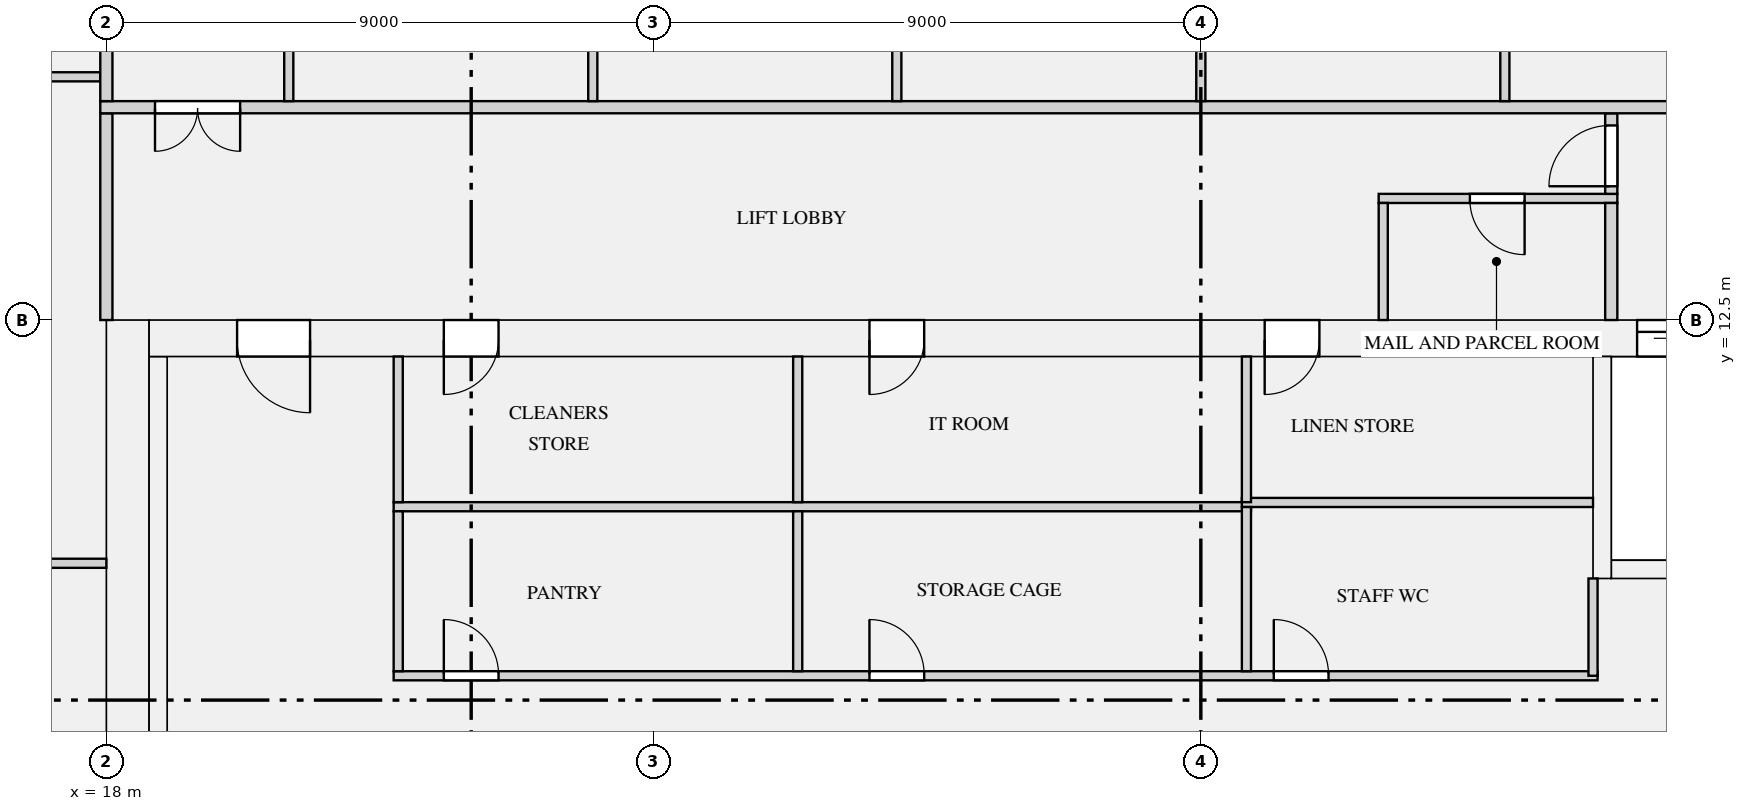
"""IFC4 building model, lengths in metres.
Left out: names, types, materials, properties, quantities, classifications, styles, units other than length and angle.
Written with IfcOpenShell. Run it as: python <this file> out.ifc"""

import sys

from ifc_helpers import new_model, si_unit, direction, frame, frame_2d, origin, place, context, subcontext, project, spatial, rectangle, extrude, element, fill, save


model = new_model("IFC4")
c1 = context("Model", 3, precision=1e-05, world=origin(), true_north=direction((0.0, 1.0)))
c2 = subcontext(c1, "Body", "Model", "MODEL_VIEW")
j1 = project(units=[si_unit("LENGTHUNIT", "METRE"), si_unit("PLANEANGLEUNIT", "RADIAN")], contexts=[c1])
p1 = place(None, origin())
s1 = spatial("IfcSite", under=j1, at=p1, CompositionType="ELEMENT")
p2 = place(p1, origin())
s2 = spatial("IfcBuilding", under=s1, at=p2, CompositionType="ELEMENT")
p3 = place(p2, frame((0.0, 0.0, 182.25)))
s3 = spatial("IfcBuildingStorey", under=s2, at=p3, CompositionType="ELEMENT", Elevation=182.25)
p4 = place(p3, frame((18.35, 0.0, 0.0), z_axis=(0.0, 0.0, 1.0), x_axis=(0.0, 1.0, 0.0)))
e1 = element("IfcWall", 1, at=p4, inside=s3, PredefinedType="SHEAR", context=c2, shape_type="SweptSolid", body=[
    extrude(rectangle(XDim=12.5, YDim=0.7, at=frame_2d((6.25, 0.0))), origin(), (0.0, 0.0, 1.0), 3.15),
])
p5 = place(p3, frame((18.7, 12.2, 0.0), z_axis=(0.0, 0.0, 1.0), x_axis=(1.0, 0.0, 0.0)))
e2 = element("IfcWall", 2, at=p5, inside=s3, PredefinedType="SHEAR", context=c2, shape_type="SweptSolid", body=[
    extrude(rectangle(XDim=34.6, YDim=0.6, at=frame_2d((17.3, 0.0))), origin(), (0.0, 0.0, 1.0), 3.15),
])
p6 = place(p5, frame((24.475, 0.0, 0.0)))
e3 = element("IfcOpeningElement", 3, at=p6, cuts=e2, PredefinedType="OPENING", context=c2, shape_type="SweptSolid", body=[
    extrude(rectangle(XDim=1.1, YDim=2.1, at=frame_2d((0.55, 1.05))), frame((0.0, 0.31, 0.0), z_axis=(0.0, -1.0, 0.0), x_axis=(1.0, 0.0, 0.0)), (0.0, 0.0, 1.0), 0.62),
])
p7 = place(p5, frame((26.725, 0.0, 0.0)))
e4 = element("IfcOpeningElement", 4, at=p7, cuts=e2, PredefinedType="OPENING", context=c2, shape_type="SweptSolid", body=[
    extrude(rectangle(XDim=1.1, YDim=2.1, at=frame_2d((0.55, 1.05))), frame((0.0, 0.31, 0.0), z_axis=(0.0, -1.0, 0.0), x_axis=(1.0, 0.0, 0.0)), (0.0, 0.0, 1.0), 0.62),
])
p8 = place(p5, frame((28.975, 0.0, 0.0)))
e5 = element("IfcOpeningElement", 5, at=p8, cuts=e2, PredefinedType="OPENING", context=c2, shape_type="SweptSolid", body=[
    extrude(rectangle(XDim=1.1, YDim=2.1, at=frame_2d((0.55, 1.05))), frame((0.0, 0.31, 0.0), z_axis=(0.0, -1.0, 0.0), x_axis=(1.0, 0.0, 0.0)), (0.0, 0.0, 1.0), 0.62),
])
p9 = place(p5, frame((4.85, 0.0, 0.0)))
e6 = element("IfcOpeningElement", 6, at=p9, cuts=e2, PredefinedType="OPENING", context=c2, shape_type="SweptSolid", body=[
    extrude(rectangle(XDim=0.9, YDim=2.1, at=frame_2d((0.45, 1.05))), frame((0.0, 0.31, 0.0), z_axis=(0.0, -1.0, 0.0), x_axis=(1.0, 0.0, 0.0)), (0.0, 0.0, 1.0), 0.62),
])
p10 = place(p5, frame((11.85, 0.0, 0.0)))
e7 = element("IfcOpeningElement", 7, at=p10, cuts=e2, PredefinedType="OPENING", context=c2, shape_type="SweptSolid", body=[
    extrude(rectangle(XDim=0.9, YDim=2.1, at=frame_2d((0.45, 1.05))), frame((0.0, 0.31, 0.0), z_axis=(0.0, -1.0, 0.0), x_axis=(1.0, 0.0, 0.0)), (0.0, 0.0, 1.0), 0.62),
])
p11 = place(p5, frame((18.35, 0.0, 0.0)))
e8 = element("IfcOpeningElement", 8, at=p11, cuts=e2, PredefinedType="OPENING", context=c2, shape_type="SweptSolid", body=[
    extrude(rectangle(XDim=0.9, YDim=2.1, at=frame_2d((0.45, 1.05))), frame((0.0, 0.31, 0.0), z_axis=(0.0, -1.0, 0.0), x_axis=(1.0, 0.0, 0.0)), (0.0, 0.0, 1.0), 0.62),
])
p12 = place(p5, frame((1.45, 0.0, 0.0)))
e9 = element("IfcOpeningElement", 9, at=p12, cuts=e2, PredefinedType="OPENING", context=c2, shape_type="SweptSolid", body=[
    extrude(rectangle(XDim=1.2, YDim=2.1, at=frame_2d((0.6, 1.05))), frame((0.0, 0.31, 0.0), z_axis=(0.0, -1.0, 0.0), x_axis=(1.0, 0.0, 0.0)), (0.0, 0.0, 1.0), 0.62),
])
p13 = place(p5, frame((31.95, 0.0, 0.0)))
e10 = element("IfcOpeningElement", 10, at=p13, cuts=e2, PredefinedType="OPENING", context=c2, shape_type="SweptSolid", body=[
    extrude(rectangle(XDim=1.2, YDim=2.1, at=frame_2d((0.6, 1.05))), frame((0.0, 0.31, 0.0), z_axis=(0.0, -1.0, 0.0), x_axis=(1.0, 0.0, 0.0)), (0.0, 0.0, 1.0), 0.62),
])
p14 = place(p3, frame((18.85, 1.0, 0.0), z_axis=(0.0, 0.0, 1.0), x_axis=(0.0, 1.0, 0.0)))
e11 = element("IfcWall", 11, at=p14, inside=s3, PredefinedType="SHEAR", context=c2, shape_type="SweptSolid", body=[
    extrude(rectangle(XDim=10.9, YDim=0.3, at=frame_2d((5.45, 0.0))), origin(), (0.0, 0.0, 1.0), 3.15),
])
p15 = place(p3, frame((42.75, 8.4, 0.0), z_axis=(0.0, 0.0, 1.0), x_axis=(1.0, 0.0, 0.0)))
e12 = element("IfcWall", 12, at=p15, inside=s3, PredefinedType="SHEAR", context=c2, shape_type="SweptSolid", body=[
    extrude(rectangle(XDim=1.95, YDim=0.3, at=frame_2d((0.975, 0.0))), origin(), (0.0, 0.0, 1.0), 3.15),
])
p16 = place(p3, frame((42.6, 8.25, 0.0), z_axis=(0.0, 0.0, 1.0), x_axis=(0.0, 1.0, 0.0)))
e13 = element("IfcWall", 13, at=p16, inside=s3, PredefinedType="SHEAR", context=c2, shape_type="SweptSolid", body=[
    extrude(rectangle(XDim=3.65, YDim=0.3, at=frame_2d((1.825, 0.0))), origin(), (0.0, 0.0, 1.0), 3.15),
])
p17 = place(p3, frame((22.725, 6.65, 0.0), z_axis=(0.0, 0.0, 1.0), x_axis=(1.0, 0.0, 0.0)))
e14 = element("IfcWall", 14, at=p17, inside=s3, PredefinedType="PARTITIONING", context=c2, shape_type="SweptSolid", body=[
    extrude(rectangle(XDim=19.8, YDim=0.15, at=frame_2d((9.9, 0.0))), origin(), (0.0, 0.0, 1.0), 2.65),
])
p18 = place(p17, frame((0.825, 0.0, 0.0)))
e15 = element("IfcOpeningElement", 15, at=p18, cuts=e14, PredefinedType="OPENING", context=c2, shape_type="SweptSolid", body=[
    extrude(rectangle(XDim=0.9, YDim=2.1, at=frame_2d((0.45, 1.05))), frame((0.0, 0.085, 0.0), z_axis=(0.0, -1.0, 0.0), x_axis=(1.0, 0.0, 0.0)), (0.0, 0.0, 1.0), 0.17),
])
p19 = place(p17, frame((7.825, 0.0, 0.0)))
e16 = element("IfcOpeningElement", 16, at=p19, cuts=e14, PredefinedType="OPENING", context=c2, shape_type="SweptSolid", body=[
    extrude(rectangle(XDim=0.9, YDim=2.1, at=frame_2d((0.45, 1.05))), frame((0.0, 0.085, 0.0), z_axis=(0.0, -1.0, 0.0), x_axis=(1.0, 0.0, 0.0)), (0.0, 0.0, 1.0), 0.17),
])
p20 = place(p17, frame((14.475, 0.0, 0.0)))
e17 = element("IfcOpeningElement", 17, at=p20, cuts=e14, PredefinedType="OPENING", context=c2, shape_type="SweptSolid", body=[
    extrude(rectangle(XDim=0.9, YDim=2.1, at=frame_2d((0.45, 1.05))), frame((0.0, 0.085, 0.0), z_axis=(0.0, -1.0, 0.0), x_axis=(1.0, 0.0, 0.0)), (0.0, 0.0, 1.0), 0.17),
])
p21 = place(p3, frame((22.725, 9.43, 0.0), z_axis=(0.0, 0.0, 1.0), x_axis=(1.0, 0.0, 0.0)))
e18 = element("IfcWall", 18, at=p21, inside=s3, PredefinedType="PARTITIONING", context=c2, shape_type="SweptSolid", body=[
    extrude(rectangle(XDim=14.1, YDim=0.15, at=frame_2d((7.05, 0.0))), origin(), (0.0, 0.0, 1.0), 2.65),
])
p22 = place(p3, frame((36.675, 9.5, 0.0), z_axis=(0.0, 0.0, 1.0), x_axis=(1.0, 0.0, 0.0)))
e19 = element("IfcWall", 19, at=p22, inside=s3, PredefinedType="PARTITIONING", context=c2, shape_type="SweptSolid", body=[
    extrude(rectangle(XDim=5.775, YDim=0.15, at=frame_2d((2.887, 0.0))), origin(), (0.0, 0.0, 1.0), 2.65),
])
p23 = place(p3, frame((38.925, 14.5, 0.0), z_axis=(0.0, 0.0, 1.0), x_axis=(1.0, 0.0, 0.0)))
e20 = element("IfcWall", 20, at=p23, inside=s3, PredefinedType="PARTITIONING", context=c2, shape_type="SweptSolid", body=[
    extrude(rectangle(XDim=3.925, YDim=0.15, at=frame_2d((1.962, 0.0))), origin(), (0.0, 0.0, 1.0), 2.65),
])
p24 = place(p23, frame((1.5, 0.0, 0.0)))
e21 = element("IfcOpeningElement", 21, at=p24, cuts=e20, PredefinedType="OPENING", context=c2, shape_type="SweptSolid", body=[
    extrude(rectangle(XDim=0.9, YDim=2.1, at=frame_2d((0.45, 1.05))), frame((0.0, 0.085, 0.0), z_axis=(0.0, -1.0, 0.0), x_axis=(1.0, 0.0, 0.0)), (0.0, 0.0, 1.0), 0.17),
])
p25 = place(p3, frame((42.45, 6.65, 0.0), z_axis=(0.0, 0.0, 1.0), x_axis=(0.0, 1.0, 0.0)))
e22 = element("IfcWall", 22, at=p25, inside=s3, PredefinedType="PARTITIONING", context=c2, shape_type="SweptSolid", body=[
    extrude(rectangle(XDim=1.6, YDim=0.15, at=frame_2d((0.8, 0.0))), origin(), (0.0, 0.0, 1.0), 2.65),
])
for number, where, z_axis, x_axis in (
    (23, (22.8, 6.725, 0.0), (0.0, 0.0, 1.0), (0.0, 1.0, 0.0)),
    (24, (29.37, 6.725, 0.0), (0.0, 0.0, 1.0), (0.0, 1.0, 0.0)),
):
    element("IfcWall", number, at=place(p3, frame(where, z_axis=z_axis, x_axis=x_axis)), inside=s3, PredefinedType="PARTITIONING", context=c2, shape_type="SweptSolid", body=[
        extrude(rectangle(XDim=2.63, YDim=0.15, at=frame_2d((1.315, 0.0))), origin(), (0.0, 0.0, 1.0), 2.65),
    ])
p26 = place(p3, frame((36.75, 6.725, 0.0), z_axis=(0.0, 0.0, 1.0), x_axis=(0.0, 1.0, 0.0)))
e25 = element("IfcWall", 25, at=p26, inside=s3, PredefinedType="PARTITIONING", context=c2, shape_type="SweptSolid", body=[
    extrude(rectangle(XDim=2.7, YDim=0.15, at=frame_2d((1.35, 0.0))), origin(), (0.0, 0.0, 1.0), 2.65),
])
for number, where, z_axis, x_axis in (
    (26, (22.8, 9.505, 0.0), (0.0, 0.0, 1.0), (0.0, 1.0, 0.0)),
    (27, (29.37, 9.505, 0.0), (0.0, 0.0, 1.0), (0.0, 1.0, 0.0)),
    (28, (36.75, 9.505, 0.0), (0.0, 0.0, 1.0), (0.0, 1.0, 0.0)),
):
    element("IfcWall", number, at=place(p3, frame(where, z_axis=z_axis, x_axis=x_axis)), inside=s3, PredefinedType="PARTITIONING", context=c2, shape_type="SweptSolid", body=[
        extrude(rectangle(XDim=2.395, YDim=0.15, at=frame_2d((1.198, 0.0))), origin(), (0.0, 0.0, 1.0), 2.65),
    ])
p27 = place(p3, frame((18.0, 12.5, 0.0), z_axis=(0.0, 0.0, 1.0), x_axis=(0.0, 1.0, 0.0)))
e29 = element("IfcWall", 29, at=p27, inside=s3, PredefinedType="PARTITIONING", context=c2, shape_type="SweptSolid", body=[
    extrude(rectangle(XDim=3.4, YDim=0.2, at=frame_2d((1.7, 0.0))), origin(), (0.0, 0.0, 1.0), 2.65),
])
p28 = place(p3, frame((39.0, 12.5, 0.0), z_axis=(0.0, 0.0, 1.0), x_axis=(0.0, 1.0, 0.0)))
e30 = element("IfcWall", 30, at=p28, inside=s3, PredefinedType="PARTITIONING", context=c2, shape_type="SweptSolid", body=[
    extrude(rectangle(XDim=1.925, YDim=0.15, at=frame_2d((0.962, 0.0))), origin(), (0.0, 0.0, 1.0), 2.65),
])
p29 = place(p3, frame((42.75, 12.5, 0.0), z_axis=(0.0, 0.0, 1.0), x_axis=(0.0, 1.0, 0.0)))
e31 = element("IfcWall", 31, at=p29, inside=s3, PredefinedType="PARTITIONING", context=c2, shape_type="SweptSolid", body=[
    extrude(rectangle(XDim=1.925, YDim=0.2, at=frame_2d((0.962, 0.0))), origin(), (0.0, 0.0, 1.0), 2.65),
])
p30 = place(p3, frame((42.75, 14.575, 0.0), z_axis=(0.0, 0.0, 1.0), x_axis=(0.0, 1.0, 0.0)))
e32 = element("IfcWall", 32, at=p30, inside=s3, PredefinedType="PARTITIONING", context=c2, shape_type="SweptSolid", body=[
    extrude(rectangle(XDim=1.325, YDim=0.2, at=frame_2d((0.663, 0.0))), origin(), (0.0, 0.0, 1.0), 2.65),
])
p31 = place(p30, frame((0.125, 0.0, 0.0)))
e33 = element("IfcOpeningElement", 33, at=p31, cuts=e32, PredefinedType="OPENING", context=c2, shape_type="SweptSolid", body=[
    extrude(rectangle(XDim=1.0, YDim=2.1, at=frame_2d((0.5, 1.05))), frame((0.0, 0.11, 0.0), z_axis=(0.0, -1.0, 0.0), x_axis=(1.0, 0.0, 0.0)), (0.0, 0.0, 1.0), 0.22),
])
p32 = place(p3, frame((7.7, 16.5, 0.0), z_axis=(0.0, 0.0, 1.0), x_axis=(1.0, 0.0, 0.0)))
e34 = element("IfcWall", 34, at=p32, inside=s3, PredefinedType="PARTITIONING", context=c2, shape_type="SweptSolid", body=[
    extrude(rectangle(XDim=10.2, YDim=0.15, at=frame_2d((5.1, 0.0))), origin(), (0.0, 0.0, 1.0), 2.65),
])
p33 = place(p32, frame((7.3, 0.0, 0.0)))
e35 = element("IfcOpeningElement", 35, at=p33, cuts=e34, PredefinedType="OPENING", context=c2, shape_type="SweptSolid", body=[
    extrude(rectangle(XDim=1.5, YDim=2.1, at=frame_2d((0.75, 1.05))), frame((0.0, 0.085, 0.0), z_axis=(0.0, -1.0, 0.0), x_axis=(1.0, 0.0, 0.0)), (0.0, 0.0, 1.0), 0.17),
])
p34 = place(p3, frame((9.075, 8.5, 0.0), z_axis=(0.0, 0.0, 1.0), x_axis=(1.0, 0.0, 0.0)))
e36 = element("IfcWall", 36, at=p34, inside=s3, PredefinedType="PARTITIONING", context=c2, shape_type="SweptSolid", body=[
    extrude(rectangle(XDim=8.925, YDim=0.15, at=frame_2d((4.462, 0.0))), origin(), (0.0, 0.0, 1.0), 2.65),
])
p35 = place(p34, frame((1.725, 0.0, 0.0)))
e37 = element("IfcOpeningElement", 37, at=p35, cuts=e36, PredefinedType="OPENING", context=c2, shape_type="SweptSolid", body=[
    extrude(rectangle(XDim=0.9, YDim=2.1, at=frame_2d((0.45, 1.05))), frame((0.0, 0.085, 0.0), z_axis=(0.0, -1.0, 0.0), x_axis=(1.0, 0.0, 0.0)), (0.0, 0.0, 1.0), 0.17),
])
p36 = place(p34, frame((6.225, 0.0, 0.0)))
e38 = element("IfcOpeningElement", 38, at=p36, cuts=e36, PredefinedType="OPENING", context=c2, shape_type="SweptSolid", body=[
    extrude(rectangle(XDim=0.9, YDim=2.1, at=frame_2d((0.45, 1.05))), frame((0.0, 0.085, 0.0), z_axis=(0.0, -1.0, 0.0), x_axis=(1.0, 0.0, 0.0)), (0.0, 0.0, 1.0), 0.17),
])
p37 = place(p3, frame((17.9, 16.0, 0.0), z_axis=(0.0, 0.0, 1.0), x_axis=(1.0, 0.0, 0.0)))
e39 = element("IfcWall", 39, at=p37, inside=s3, PredefinedType="PARTITIONING", context=c2, shape_type="SweptSolid", body=[
    extrude(rectangle(XDim=36.2, YDim=0.2, at=frame_2d((18.1, 0.0))), origin(), (0.0, 0.0, 1.0), 2.65),
])
p38 = place(p37, frame((0.9, 0.0, 0.0)))
e40 = element("IfcOpeningElement", 40, at=p38, cuts=e39, PredefinedType="OPENING", context=c2, shape_type="SweptSolid", body=[
    extrude(rectangle(XDim=1.4, YDim=2.1, at=frame_2d((0.7, 1.05))), frame((0.0, 0.11, 0.0), z_axis=(0.0, -1.0, 0.0), x_axis=(1.0, 0.0, 0.0)), (0.0, 0.0, 1.0), 0.22),
])
p39 = place(p37, frame((33.9, 0.0, 0.0)))
e41 = element("IfcOpeningElement", 41, at=p39, cuts=e39, PredefinedType="OPENING", context=c2, shape_type="SweptSolid", body=[
    extrude(rectangle(XDim=1.4, YDim=2.1, at=frame_2d((0.7, 1.05))), frame((0.0, 0.11, 0.0), z_axis=(0.0, -1.0, 0.0), x_axis=(1.0, 0.0, 0.0)), (0.0, 0.0, 1.0), 0.22),
])
p40 = place(p3, frame((18.0, 16.1, 0.0), z_axis=(0.0, 0.0, 1.0), x_axis=(0.0, 1.0, 0.0)))
e42 = element("IfcWall", 42, at=p40, inside=s3, PredefinedType="PARTITIONING", context=c2, shape_type="SweptSolid", body=[
    extrude(rectangle(XDim=7.8, YDim=0.2, at=frame_2d((3.9, 0.0))), origin(), (0.0, 0.0, 1.0), 2.65),
])
for number, where, z_axis, x_axis in (
    (43, (21.0, 16.1, 0.0), (0.0, 0.0, 1.0), (0.0, 1.0, 0.0)),
    (44, (26.0, 16.1, 0.0), (0.0, 0.0, 1.0), (0.0, 1.0, 0.0)),
    (45, (31.0, 16.1, 0.0), (0.0, 0.0, 1.0), (0.0, 1.0, 0.0)),
    (46, (36.0, 16.1, 0.0), (0.0, 0.0, 1.0), (0.0, 1.0, 0.0)),
    (47, (41.0, 16.1, 0.0), (0.0, 0.0, 1.0), (0.0, 1.0, 0.0)),
):
    element("IfcWall", number, at=place(p3, frame(where, z_axis=z_axis, x_axis=x_axis)), inside=s3, PredefinedType="PARTITIONING", context=c2, shape_type="SweptSolid", body=[
        extrude(rectangle(XDim=4.825, YDim=0.15, at=frame_2d((2.413, 0.0))), origin(), (0.0, 0.0, 1.0), 2.65),
    ])
p41 = place(p6, origin())
e48 = element("IfcDoor", 48, at=p41, inside=s3, OperationType="DOUBLE_DOOR_SLIDING", PredefinedType="DOOR", context=c2, shape_type="SweptSolid", body=[
    extrude(rectangle(XDim=1.1, YDim=2.1, at=frame_2d((0.55, 1.05))), frame((0.0, 0.025, 0.0), z_axis=(0.0, -1.0, 0.0), x_axis=(1.0, 0.0, 0.0)), (0.0, 0.0, 1.0), 0.05),
])
fill(e3, e48)
p42 = place(p24, frame((0.9, 0.0, 0.0), z_axis=(0.0, 0.0, 1.0), x_axis=(-1.0, 0.0, 0.0)))
e49 = element("IfcDoor", 49, at=p42, inside=s3, OperationType="SINGLE_SWING_LEFT", PredefinedType="DOOR", context=c2, shape_type="SweptSolid", body=[
    extrude(rectangle(XDim=0.9, YDim=2.1, at=frame_2d((0.45, 1.05))), frame((0.0, 0.025, 0.0), z_axis=(0.0, -1.0, 0.0), x_axis=(1.0, 0.0, 0.0)), (0.0, 0.0, 1.0), 0.05),
])
fill(e21, e49)
p43 = place(p18, origin())
e50 = element("IfcDoor", 50, at=p43, inside=s3, OperationType="SINGLE_SWING_LEFT", PredefinedType="DOOR", context=c2, shape_type="SweptSolid", body=[
    extrude(rectangle(XDim=0.9, YDim=2.1, at=frame_2d((0.45, 1.05))), frame((0.0, 0.025, 0.0), z_axis=(0.0, -1.0, 0.0), x_axis=(1.0, 0.0, 0.0)), (0.0, 0.0, 1.0), 0.05),
])
fill(e15, e50)
p44 = place(p19, origin())
e51 = element("IfcDoor", 51, at=p44, inside=s3, OperationType="SINGLE_SWING_LEFT", PredefinedType="DOOR", context=c2, shape_type="SweptSolid", body=[
    extrude(rectangle(XDim=0.9, YDim=2.1, at=frame_2d((0.45, 1.05))), frame((0.0, 0.025, 0.0), z_axis=(0.0, -1.0, 0.0), x_axis=(1.0, 0.0, 0.0)), (0.0, 0.0, 1.0), 0.05),
])
fill(e16, e51)
p45 = place(p9, frame((0.9, 0.0, 0.0), z_axis=(0.0, 0.0, 1.0), x_axis=(-1.0, 0.0, 0.0)))
e52 = element("IfcDoor", 52, at=p45, inside=s3, OperationType="SINGLE_SWING_RIGHT", PredefinedType="DOOR", context=c2, shape_type="SweptSolid", body=[
    extrude(rectangle(XDim=0.9, YDim=2.1, at=frame_2d((0.45, 1.05))), frame((0.0, 0.025, 0.0), z_axis=(0.0, -1.0, 0.0), x_axis=(1.0, 0.0, 0.0)), (0.0, 0.0, 1.0), 0.05),
])
fill(e6, e52)
p46 = place(p10, frame((0.9, 0.0, 0.0), z_axis=(0.0, 0.0, 1.0), x_axis=(-1.0, 0.0, 0.0)))
e53 = element("IfcDoor", 53, at=p46, inside=s3, OperationType="SINGLE_SWING_RIGHT", PredefinedType="DOOR", context=c2, shape_type="SweptSolid", body=[
    extrude(rectangle(XDim=0.9, YDim=2.1, at=frame_2d((0.45, 1.05))), frame((0.0, 0.025, 0.0), z_axis=(0.0, -1.0, 0.0), x_axis=(1.0, 0.0, 0.0)), (0.0, 0.0, 1.0), 0.05),
])
fill(e7, e53)
p47 = place(p20, origin())
e54 = element("IfcDoor", 54, at=p47, inside=s3, OperationType="SINGLE_SWING_LEFT", PredefinedType="DOOR", context=c2, shape_type="SweptSolid", body=[
    extrude(rectangle(XDim=0.9, YDim=2.1, at=frame_2d((0.45, 1.05))), frame((0.0, 0.025, 0.0), z_axis=(0.0, -1.0, 0.0), x_axis=(1.0, 0.0, 0.0)), (0.0, 0.0, 1.0), 0.05),
])
fill(e17, e54)
p48 = place(p11, frame((0.9, 0.0, 0.0), z_axis=(0.0, 0.0, 1.0), x_axis=(-1.0, 0.0, 0.0)))
e55 = element("IfcDoor", 55, at=p48, inside=s3, OperationType="SINGLE_SWING_RIGHT", PredefinedType="DOOR", context=c2, shape_type="SweptSolid", body=[
    extrude(rectangle(XDim=0.9, YDim=2.1, at=frame_2d((0.45, 1.05))), frame((0.0, 0.025, 0.0), z_axis=(0.0, -1.0, 0.0), x_axis=(1.0, 0.0, 0.0)), (0.0, 0.0, 1.0), 0.05),
])
fill(e8, e55)
p49 = place(p12, frame((1.2, 0.0, 0.0), z_axis=(0.0, 0.0, 1.0), x_axis=(-1.0, 0.0, 0.0)))
e56 = element("IfcDoor", 56, at=p49, inside=s3, OperationType="SINGLE_SWING_LEFT", PredefinedType="DOOR", context=c2, shape_type="SweptSolid", body=[
    extrude(rectangle(XDim=1.2, YDim=2.1, at=frame_2d((0.6, 1.05))), frame((0.0, 0.025, 0.0), z_axis=(0.0, -1.0, 0.0), x_axis=(1.0, 0.0, 0.0)), (0.0, 0.0, 1.0), 0.05),
])
fill(e9, e56)
p50 = place(p31, origin())
e57 = element("IfcDoor", 57, at=p50, inside=s3, OperationType="SINGLE_SWING_LEFT", PredefinedType="DOOR", context=c2, shape_type="SweptSolid", body=[
    extrude(rectangle(XDim=1.0, YDim=2.1, at=frame_2d((0.5, 1.05))), frame((0.0, 0.025, 0.0), z_axis=(0.0, -1.0, 0.0), x_axis=(1.0, 0.0, 0.0)), (0.0, 0.0, 1.0), 0.05),
])
fill(e33, e57)
p51 = place(p38, frame((1.4, 0.0, 0.0), z_axis=(0.0, 0.0, 1.0), x_axis=(-1.0, 0.0, 0.0)))
e58 = element("IfcDoor", 58, at=p51, inside=s3, OperationType="DOUBLE_DOOR_SINGLE_SWING", PredefinedType="DOOR", context=c2, shape_type="SweptSolid", body=[
    extrude(rectangle(XDim=1.4, YDim=2.1, at=frame_2d((0.7, 1.05))), frame((0.0, 0.025, 0.0), z_axis=(0.0, -1.0, 0.0), x_axis=(1.0, 0.0, 0.0)), (0.0, 0.0, 1.0), 0.05),
])
fill(e40, e58)
save(model, sys.argv[1])
